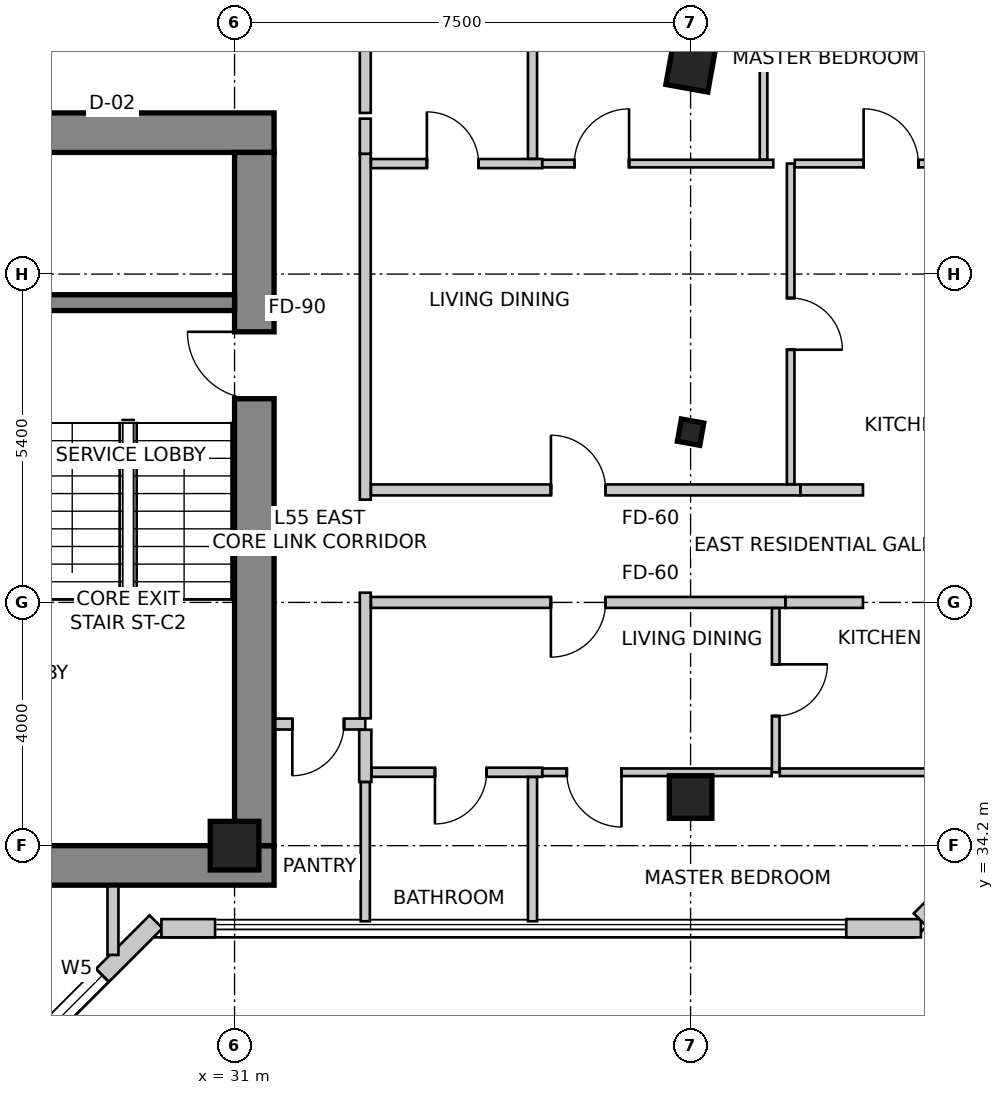
"""IFC4 building model, lengths in metres.
Left out: names, types, materials, properties, quantities, classifications, styles, units other than length and angle.
Written with IfcOpenShell. Run it as: python <this file> out.ifc"""

import sys

from ifc_helpers import new_model, si_unit, direction, frame, frame_2d, origin, origin_2d, place, context, subcontext, project, spatial, rectangle, i_section, extrude, source, transform, mapped, element, fill, save


model = new_model("IFC4")
c1 = context("Model", 3, precision=1e-05, world=origin(), true_north=direction((0.0, 1.0)))
c2 = subcontext(c1, "Body", "Model", "MODEL_VIEW")
j1 = project(units=[si_unit("LENGTHUNIT", "METRE"), si_unit("PLANEANGLEUNIT", "RADIAN")], contexts=[c1])
p1 = place(None, origin())
s1 = spatial("IfcSite", under=j1, at=p1, CompositionType="ELEMENT")
p2 = place(p1, origin())
s2 = spatial("IfcBuilding", under=s1, at=p2, CompositionType="ELEMENT")
p3 = place(p2, frame((0.0, 0.0, 218.4)))
s3 = spatial("IfcBuildingStorey", under=s2, at=p3, CompositionType="ELEMENT", Elevation=218.4)
p4 = place(p3, frame((15.95, 45.925, 0.0), z_axis=(0.0, 0.0, 1.0), x_axis=(1.0, 0.0, 0.0)))
e1 = element("IfcWall", 1, at=p4, inside=s3, PredefinedType="SHEAR", context=c2, shape_type="SweptSolid", body=[
    extrude(rectangle(XDim=15.7, YDim=0.65, at=frame_2d((7.85, 0.0))), origin(), (0.0, 0.0, 1.0), 3.5),
])
p5 = place(p3, frame((15.95, 33.875, 0.0), z_axis=(0.0, 0.0, 1.0), x_axis=(1.0, 0.0, 0.0)))
e2 = element("IfcWall", 2, at=p5, inside=s3, PredefinedType="SHEAR", context=c2, shape_type="SweptSolid", body=[
    extrude(rectangle(XDim=15.7, YDim=0.65, at=frame_2d((7.85, 0.0))), origin(), (0.0, 0.0, 1.0), 3.5),
])
m1 = source(origin(), c2, "Body", "SweptSolid", [
    extrude(rectangle(XDim=1.1, YDim=2.15, at=frame_2d((0.55, 1.075))), frame((0.0, 0.335, 0.0), z_axis=(0.0, -1.0, 0.0), x_axis=(1.0, 0.0, 0.0)), (0.0, 0.0, 1.0), 0.67),
])
p6 = place(p5, frame((10.08, 0.0, 0.0)))
e3 = element("IfcOpeningElement", 3, at=p6, cuts=e2, PredefinedType="OPENING", context=c2, shape_type="MappedRepresentation", body=[
    mapped(m1, transform((0.0, 0.0, 0.0), scale=1.0)),
])
p7 = place(p3, frame((31.325, 34.2, 0.0), z_axis=(0.0, 0.0, 1.0), x_axis=(0.0, 1.0, 0.0)))
e4 = element("IfcWall", 4, at=p7, inside=s3, PredefinedType="SHEAR", context=c2, shape_type="SweptSolid", body=[
    extrude(rectangle(XDim=11.4, YDim=0.65, at=frame_2d((5.7, 0.0))), origin(), (0.0, 0.0, 1.0), 3.5),
])
p8 = place(p7, frame((7.35, 0.0, 0.0)))
e5 = element("IfcOpeningElement", 5, at=p8, cuts=e4, PredefinedType="OPENING", context=c2, shape_type="MappedRepresentation", body=[
    mapped(m1, transform((0.0, 0.0, 0.0), scale=1.0)),
])
p9 = place(p3, frame((27.5, 43.13, 0.0), z_axis=(0.0, 0.0, 1.0), x_axis=(1.0, 0.0, 0.0)))
e6 = element("IfcWall", 6, at=p9, inside=s3, PredefinedType="SHEAR", context=c2, shape_type="SweptSolid", body=[
    extrude(rectangle(XDim=3.5, YDim=0.26, at=frame_2d((1.75, 0.0))), origin(), (0.0, 0.0, 1.0), 3.5),
])
m2 = source(origin(), c2, "Body", "SweptSolid", [
    extrude(rectangle(XDim=0.7, YDim=0.7, at=origin_2d()), origin(), (0.0, 0.0, 1.0), 3.5),
])
p10 = place(p3, frame((38.5, 47.0, 0.0), z_axis=(0.0, 0.0, 1.0), x_axis=(0.984195607969, -0.17708474032, 0.0)))
e7 = element("IfcColumn", 7, at=p10, inside=s3, PredefinedType="COLUMN", context=c2, shape_type="MappedRepresentation", body=[
    mapped(m2, transform((0.0, 0.0, 0.0), scale=1.0)),
])
m3 = source(origin(), c2, "Body", "SweptSolid", [
    extrude(rectangle(XDim=0.8, YDim=0.8, at=origin_2d()), origin(), (0.0, 0.0, 1.0), 3.5),
])
p11 = place(p3, frame((31.0, 34.2, 0.0), z_axis=(0.0, 0.0, 1.0), x_axis=(1.0, 0.0, 0.0)))
e8 = element("IfcColumn", 8, at=p11, inside=s3, PredefinedType="COLUMN", context=c2, shape_type="MappedRepresentation", body=[
    mapped(m3, transform((0.0, 0.0, 0.0), scale=1.0)),
])
p12 = place(p3, frame((38.5, 35.0, 0.0), z_axis=(0.0, 0.0, 1.0), x_axis=(1.0, 0.0, 0.0)))
e9 = element("IfcColumn", 9, at=p12, inside=s3, PredefinedType="COLUMN", context=c2, shape_type="MappedRepresentation", body=[
    mapped(m2, transform((0.0, 0.0, 0.0), scale=1.0)),
])
m4 = source(origin(), c2, "Body", "SweptSolid", [
    extrude(i_section(OverallWidth=0.374, OverallDepth=0.372, WebThickness=0.016, FlangeThickness=0.026, FilletRadius=0.015, at=origin_2d()), origin(), (0.0, 0.0, 1.0), 3.5),
])
p13 = place(p3, frame((38.5, 41.0, 0.0), z_axis=(0.0, 0.0, 1.0), x_axis=(0.984195607969, -0.17708474032, 0.0)))
e10 = element("IfcColumn", 10, at=p13, inside=s3, PredefinedType="COLUMN", context=c2, shape_type="MappedRepresentation", body=[
    mapped(m4, transform((0.0, 0.0, 0.0), scale=1.0)),
])
p14 = place(p3, frame((27.652, 30.892, 0.0), z_axis=(0.0, 0.0, 1.0), x_axis=(0.707106781187, 0.707106781187, 0.0)))
e11 = element("IfcWall", 11, at=p14, inside=s3, PredefinedType="SOLIDWALL", context=c2, shape_type="SweptSolid", body=[
    extrude(rectangle(XDim=2.907, YDim=0.3, at=frame_2d((1.454, 0.0))), origin(), (0.0, 0.0, 1.0), 3.25),
])
m5 = source(origin(), c2, "Body", "SweptSolid", [
    extrude(rectangle(XDim=1.2, YDim=1.6, at=frame_2d((0.6, 0.8))), frame((0.0, 0.16, 0.0), z_axis=(0.0, -1.0, 0.0), x_axis=(1.0, 0.0, 0.0)), (0.0, 0.0, 1.0), 0.32),
])
p15 = place(p14, frame((0.461, 0.0, 0.85)))
e12 = element("IfcOpeningElement", 12, at=p15, cuts=e11, PredefinedType="OPENING", context=c2, shape_type="MappedRepresentation", body=[
    mapped(m5, transform((0.0, 0.0, 0.0), scale=1.0)),
])
p16 = place(p3, frame((29.797, 32.842, 0.0), z_axis=(0.0, 0.0, 1.0), x_axis=(1.0, 0.0, 0.0)))
e13 = element("IfcWall", 13, at=p16, inside=s3, PredefinedType="SOLIDWALL", context=c2, shape_type="SweptSolid", body=[
    extrude(rectangle(XDim=0.882, YDim=0.3, at=frame_2d((0.441, 0.0))), origin(), (0.0, 0.0, 1.0), 3.25),
])
p17 = place(p3, frame((41.06, 32.842, 0.0), z_axis=(0.0, 0.0, 1.0), x_axis=(1.0, 0.0, 0.0)))
e14 = element("IfcWall", 14, at=p17, inside=s3, PredefinedType="SOLIDWALL", context=c2, shape_type="SweptSolid", body=[
    extrude(rectangle(XDim=1.228, YDim=0.3, at=frame_2d((0.614, 0.0))), origin(), (0.0, 0.0, 1.0), 3.25),
])
p18 = place(p3, frame((42.276, 32.98, 0.0), z_axis=(0.0, 0.0, 1.0), x_axis=(0.707106781187, 0.707106781187, 0.0)))
e15 = element("IfcWall", 15, at=p18, inside=s3, PredefinedType="SOLIDWALL", context=c2, shape_type="SweptSolid", body=[
    extrude(rectangle(XDim=4.922, YDim=0.3, at=frame_2d((2.461, 0.0))), origin(), (0.0, 0.0, 1.0), 3.25),
])
m6 = source(origin(), c2, "Body", "SweptSolid", [
    extrude(rectangle(XDim=2.4, YDim=2.2, at=frame_2d((1.2, 1.1))), frame((0.0, 0.16, 0.0), z_axis=(0.0, -1.0, 0.0), x_axis=(1.0, 0.0, 0.0)), (0.0, 0.0, 1.0), 0.32),
])
p19 = place(p18, frame((0.509, 0.0, 0.85)))
e16 = element("IfcOpeningElement", 16, at=p19, cuts=e15, PredefinedType="OPENING", context=c2, shape_type="MappedRepresentation", body=[
    mapped(m6, transform((0.0, 0.0, 0.0), scale=1.0)),
])
p20 = place(p3, frame((29.0, 33.53, 0.0), z_axis=(0.0, 0.0, 1.0), x_axis=(0.0, -1.0, 0.0)))
e17 = element("IfcWall", 17, at=p20, inside=s3, PredefinedType="PARTITIONING", context=c2, shape_type="SweptSolid", body=[
    extrude(rectangle(XDim=1.127, YDim=0.18, at=frame_2d((0.563, 0.0))), origin(), (0.0, 0.0, 1.0), 3.25),
])
p21 = place(p3, frame((33.15, 47.706, 0.0), z_axis=(0.0, 0.0, 1.0), x_axis=(0.0, -1.0, 0.0)))
e18 = element("IfcWall", 18, at=p21, inside=s3, PredefinedType="PARTITIONING", context=c2, shape_type="SweptSolid", body=[
    extrude(rectangle(XDim=1.456, YDim=0.18, at=frame_2d((0.728, 0.0))), origin(), (0.0, 0.0, 1.0), 2.919),
])
p22 = place(p3, frame((33.15, 36.2, 0.0), z_axis=(0.0, 0.0, 1.0), x_axis=(-1.0, 0.0, 0.0)))
e19 = element("IfcWall", 19, at=p22, inside=s3, PredefinedType="PARTITIONING", context=c2, shape_type="SweptSolid", body=[
    extrude(rectangle(XDim=1.48, YDim=0.18, at=frame_2d((0.74, 0.0))), origin(), (0.0, 0.0, 1.0), 3.25),
])
m7 = source(origin(), c2, "Body", "SweptSolid", [
    extrude(rectangle(XDim=0.85, YDim=2.15, at=frame_2d((0.425, 1.075))), frame((0.0, 0.1, 0.0), z_axis=(0.0, -1.0, 0.0), x_axis=(1.0, 0.0, 0.0)), (0.0, 0.0, 1.0), 0.2),
])
p23 = place(p22, frame((0.35, 0.0, 0.0)))
e20 = element("IfcOpeningElement", 20, at=p23, cuts=e19, PredefinedType="OPENING", context=c2, shape_type="MappedRepresentation", body=[
    mapped(m7, transform((0.0, 0.0, 0.0), scale=1.0)),
])
p24 = place(p3, frame((33.15, 45.577, 0.0), z_axis=(0.0, 0.0, 1.0), x_axis=(0.0, -1.0, 0.0)))
e21 = element("IfcWall", 21, at=p24, inside=s3, PredefinedType="PARTITIONING", context=c2, shape_type="SweptSolid", body=[
    extrude(rectangle(XDim=5.687, YDim=0.18, at=frame_2d((2.844, 0.0))), origin(), (0.0, 0.0, 1.0), 2.779),
])
p25 = place(p3, frame((33.15, 46.156, 0.0), z_axis=(0.0, 0.0, 1.0), x_axis=(0.0, -1.0, 0.0)))
e22 = element("IfcWall", 22, at=p25, inside=s3, PredefinedType="PARTITIONING", context=c2, shape_type="SweptSolid", body=[
    extrude(rectangle(XDim=0.577, YDim=0.18, at=frame_2d((0.289, 0.0))), origin(), (0.0, 0.0, 1.0), 2.779),
])
p26 = place(p3, frame((33.15, 38.36, 0.0), z_axis=(0.0, 0.0, 1.0), x_axis=(0.0, -1.0, 0.0)))
e23 = element("IfcWall", 23, at=p26, inside=s3, PredefinedType="PARTITIONING", context=c2, shape_type="SweptSolid", body=[
    extrude(rectangle(XDim=2.066, YDim=0.18, at=frame_2d((1.033, 0.0))), origin(), (0.0, 0.0, 1.0), 3.25),
])
p27 = place(p3, frame((33.244, 40.05, 0.0), z_axis=(0.0, 0.0, 1.0), x_axis=(1.0, 0.0, 0.0)))
e24 = element("IfcWall", 24, at=p27, inside=s3, PredefinedType="PARTITIONING", context=c2, shape_type="SweptSolid", body=[
    extrude(rectangle(XDim=7.062, YDim=0.18, at=frame_2d((3.531, 0.0))), origin(), (0.0, 0.0, 1.0), 2.766),
])
m8 = source(origin(), c2, "Body", "SweptSolid", [
    extrude(rectangle(XDim=0.9, YDim=2.15, at=frame_2d((0.45, 1.075))), frame((0.0, 0.1, 0.0), z_axis=(0.0, -1.0, 0.0), x_axis=(1.0, 0.0, 0.0)), (0.0, 0.0, 1.0), 0.2),
])
p28 = place(p27, frame((2.959, 0.0, 0.0)))
e25 = element("IfcOpeningElement", 25, at=p28, cuts=e24, PredefinedType="OPENING", context=c2, shape_type="MappedRepresentation", body=[
    mapped(m8, transform((0.0, 0.0, 0.0), scale=1.0)),
])
p29 = place(p3, frame((40.308, 40.05, 0.0), z_axis=(0.0, 0.0, 1.0), x_axis=(1.0, 0.0, 0.0)))
e26 = element("IfcWall", 26, at=p29, inside=s3, PredefinedType="PARTITIONING", context=c2, shape_type="SweptSolid", body=[
    extrude(rectangle(XDim=1.027, YDim=0.18, at=frame_2d((0.513, 0.0))), origin(), (0.0, 0.0, 1.0), 3.25),
])
p30 = place(p3, frame((40.06, 38.2, 0.0), z_axis=(0.0, 0.0, 1.0), x_axis=(-1.0, 0.0, 0.0)))
e27 = element("IfcWall", 27, at=p30, inside=s3, PredefinedType="PARTITIONING", context=c2, shape_type="SweptSolid", body=[
    extrude(rectangle(XDim=6.816, YDim=0.18, at=frame_2d((3.408, 0.0))), origin(), (0.0, 0.0, 1.0), 2.766),
])
p31 = place(p30, frame((2.958, 0.0, 0.0)))
e28 = element("IfcOpeningElement", 28, at=p31, cuts=e27, PredefinedType="OPENING", context=c2, shape_type="MappedRepresentation", body=[
    mapped(m8, transform((0.0, 0.0, 0.0), scale=1.0)),
])
p32 = place(p3, frame((41.335, 38.2, 0.0), z_axis=(0.0, 0.0, 1.0), x_axis=(-1.0, 0.0, 0.0)))
e29 = element("IfcWall", 29, at=p32, inside=s3, PredefinedType="PARTITIONING", context=c2, shape_type="SweptSolid", body=[
    extrude(rectangle(XDim=1.273, YDim=0.18, at=frame_2d((0.636, 0.0))), origin(), (0.0, 0.0, 1.0), 3.25),
])
p33 = place(p3, frame((33.15, 36.106, 0.0), z_axis=(0.0, 0.0, 1.0), x_axis=(0.0, -1.0, 0.0)))
e30 = element("IfcWall", 30, at=p33, inside=s3, PredefinedType="PARTITIONING", context=c2, shape_type="SweptSolid", body=[
    extrude(rectangle(XDim=0.859, YDim=0.2, at=frame_2d((0.429, 0.0))), origin(), (0.0, 0.0, 1.0), 3.25),
])
p34 = place(p3, frame((33.15, 35.245, 0.0), z_axis=(0.0, 0.0, 1.0), x_axis=(0.0, -1.0, 0.0)))
e31 = element("IfcWall", 31, at=p34, inside=s3, PredefinedType="PARTITIONING", context=c2, shape_type="SweptSolid", body=[
    extrude(rectangle(XDim=2.288, YDim=0.15, at=frame_2d((1.144, 0.0))), origin(), (0.0, 0.0, 1.0), 3.25),
])
p35 = place(p3, frame((40.146, 45.417, 0.0), z_axis=(0.0, 0.0, 1.0), x_axis=(0.0, -1.0, 0.0)))
e32 = element("IfcWall", 32, at=p35, inside=s3, PredefinedType="PARTITIONING", context=c2, shape_type="SweptSolid", body=[
    extrude(rectangle(XDim=5.273, YDim=0.125, at=frame_2d((2.636, 0.0))), origin(), (0.0, 0.0, 1.0), 3.25),
])
m9 = source(origin(), c2, "Body", "SweptSolid", [
    extrude(rectangle(XDim=0.85, YDim=2.15, at=frame_2d((0.425, 1.075))), frame((0.0, 0.073, 0.0), z_axis=(0.0, -1.0, 0.0), x_axis=(1.0, 0.0, 0.0)), (0.0, 0.0, 1.0), 0.145),
])
p36 = place(p35, frame((2.211, 0.0, 0.0)))
e33 = element("IfcOpeningElement", 33, at=p36, cuts=e32, PredefinedType="OPENING", context=c2, shape_type="MappedRepresentation", body=[
    mapped(m9, transform((0.0, 0.0, 0.0), scale=1.0)),
])
p37 = place(p3, frame((33.244, 45.417, 0.0), z_axis=(0.0, 0.0, 1.0), x_axis=(1.0, 0.0, 0.0)))
e34 = element("IfcWall", 34, at=p37, inside=s3, PredefinedType="PARTITIONING", context=c2, shape_type="SweptSolid", body=[
    extrude(rectangle(XDim=2.816, YDim=0.15, at=frame_2d((1.408, 0.0))), origin(), (0.0, 0.0, 1.0), 2.919),
])
m10 = source(origin(), c2, "Body", "SweptSolid", [
    extrude(rectangle(XDim=0.85, YDim=2.15, at=frame_2d((0.425, 1.075))), frame((0.0, 0.085, 0.0), z_axis=(0.0, -1.0, 0.0), x_axis=(1.0, 0.0, 0.0)), (0.0, 0.0, 1.0), 0.17),
])
p38 = place(p37, frame((0.919, 0.0, 0.0)))
e35 = element("IfcOpeningElement", 35, at=p38, cuts=e34, PredefinedType="OPENING", context=c2, shape_type="MappedRepresentation", body=[
    mapped(m10, transform((0.0, 0.0, 0.0), scale=1.0)),
])
p39 = place(p3, frame((36.062, 45.417, 0.0), z_axis=(0.0, 0.0, 1.0), x_axis=(1.0, 0.0, 0.0)))
e36 = element("IfcWall", 36, at=p39, inside=s3, PredefinedType="PARTITIONING", context=c2, shape_type="SweptSolid", body=[
    extrude(rectangle(XDim=3.798, YDim=0.125, at=frame_2d((1.899, 0.0))), origin(), (0.0, 0.0, 1.0), 2.766),
])
m11 = source(origin(), c2, "Body", "SweptSolid", [
    extrude(rectangle(XDim=0.9, YDim=2.15, at=frame_2d((0.45, 1.075))), frame((0.0, 0.073, 0.0), z_axis=(0.0, -1.0, 0.0), x_axis=(1.0, 0.0, 0.0)), (0.0, 0.0, 1.0), 0.145),
])
p40 = place(p39, frame((0.526, 0.0, 0.0)))
e37 = element("IfcOpeningElement", 37, at=p40, cuts=e36, PredefinedType="OPENING", context=c2, shape_type="MappedRepresentation", body=[
    mapped(m11, transform((0.0, 0.0, 0.0), scale=1.0)),
])
p41 = place(p3, frame((40.212, 45.417, 0.0), z_axis=(0.0, 0.0, 1.0), x_axis=(1.0, 0.0, 0.0)))
e38 = element("IfcWall", 38, at=p41, inside=s3, PredefinedType="PARTITIONING", context=c2, shape_type="SweptSolid", body=[
    extrude(rectangle(XDim=3.288, YDim=0.125, at=frame_2d((1.644, 0.0))), origin(), (0.0, 0.0, 1.0), 3.25),
])
p42 = place(p41, frame((1.133, 0.0, 0.0)))
e39 = element("IfcOpeningElement", 39, at=p42, cuts=e38, PredefinedType="OPENING", context=c2, shape_type="MappedRepresentation", body=[
    mapped(m11, transform((0.0, 0.0, 0.0), scale=1.0)),
])
p43 = place(p3, frame((35.9, 50.303, 0.0), z_axis=(0.0, 0.0, 1.0), x_axis=(0.0, -1.0, 0.0)))
e40 = element("IfcWall", 40, at=p43, inside=s3, PredefinedType="PARTITIONING", context=c2, shape_type="SweptSolid", body=[
    extrude(rectangle(XDim=4.807, YDim=0.15, at=frame_2d((2.403, 0.0))), origin(), (0.0, 0.0, 1.0), 2.542),
])
p44 = place(p3, frame((39.7, 49.639, 0.0), z_axis=(0.0, 0.0, 1.0), x_axis=(0.0, -1.0, 0.0)))
e41 = element("IfcWall", 41, at=p44, inside=s3, PredefinedType="PARTITIONING", context=c2, shape_type="SweptSolid", body=[
    extrude(rectangle(XDim=4.156, YDim=0.125, at=frame_2d((2.078, 0.0))), origin(), (0.0, 0.0, 1.0), 3.25),
])
p45 = place(p3, frame((39.9, 38.106, 0.0), z_axis=(0.0, 0.0, 1.0), x_axis=(0.0, -1.0, 0.0)))
e42 = element("IfcWall", 42, at=p45, inside=s3, PredefinedType="PARTITIONING", context=c2, shape_type="SweptSolid", body=[
    extrude(rectangle(XDim=2.699, YDim=0.125, at=frame_2d((1.35, 0.0))), origin(), (0.0, 0.0, 1.0), 3.25),
])
p46 = place(p45, frame((0.925, 0.0, 0.0)))
e43 = element("IfcOpeningElement", 43, at=p46, cuts=e42, PredefinedType="OPENING", context=c2, shape_type="MappedRepresentation", body=[
    mapped(m9, transform((0.0, 0.0, 0.0), scale=1.0)),
])
p47 = place(p3, frame((36.06, 35.407, 0.0), z_axis=(0.0, 0.0, 1.0), x_axis=(-1.0, 0.0, 0.0)))
e44 = element("IfcWall", 44, at=p47, inside=s3, PredefinedType="PARTITIONING", context=c2, shape_type="SweptSolid", body=[
    extrude(rectangle(XDim=2.806, YDim=0.15, at=frame_2d((1.403, 0.0))), origin(), (0.0, 0.0, 1.0), 3.25),
])
p48 = place(p47, frame((0.915, 0.0, 0.0)))
e45 = element("IfcOpeningElement", 45, at=p48, cuts=e44, PredefinedType="OPENING", context=c2, shape_type="MappedRepresentation", body=[
    mapped(m10, transform((0.0, 0.0, 0.0), scale=1.0)),
])
p49 = place(p3, frame((39.833, 35.407, 0.0), z_axis=(0.0, 0.0, 1.0), x_axis=(-1.0, 0.0, 0.0)))
e46 = element("IfcWall", 46, at=p49, inside=s3, PredefinedType="PARTITIONING", context=c2, shape_type="SweptSolid", body=[
    extrude(rectangle(XDim=3.771, YDim=0.125, at=frame_2d((1.886, 0.0))), origin(), (0.0, 0.0, 1.0), 2.766),
])
p50 = place(p49, frame((2.47, 0.0, 0.0)))
e47 = element("IfcOpeningElement", 47, at=p50, cuts=e46, PredefinedType="OPENING", context=c2, shape_type="MappedRepresentation", body=[
    mapped(m11, transform((0.0, 0.0, 0.0), scale=1.0)),
])
p51 = place(p3, frame((44.54, 35.407, 0.0), z_axis=(0.0, 0.0, 1.0), x_axis=(-1.0, 0.0, 0.0)))
e48 = element("IfcWall", 48, at=p51, inside=s3, PredefinedType="PARTITIONING", context=c2, shape_type="SweptSolid", body=[
    extrude(rectangle(XDim=4.574, YDim=0.125, at=frame_2d((2.287, 0.0))), origin(), (0.0, 0.0, 1.0), 3.25),
])
p52 = place(p3, frame((35.9, 35.328, 0.0), z_axis=(0.0, 0.0, 1.0), x_axis=(0.0, -1.0, 0.0)))
e49 = element("IfcWall", 49, at=p52, inside=s3, PredefinedType="PARTITIONING", context=c2, shape_type="SweptSolid", body=[
    extrude(rectangle(XDim=2.371, YDim=0.15, at=frame_2d((1.186, 0.0))), origin(), (0.0, 0.0, 1.0), 3.25),
])
m12 = source(origin(), c2, "Body", "SweptSolid", [
    extrude(rectangle(XDim=1.2, YDim=1.6, at=frame_2d((0.6, 0.8))), frame((0.0, -0.015, 0.0), z_axis=(0.0, -1.0, 0.0), x_axis=(1.0, 0.0, 0.0)), (0.0, 0.0, 1.0), 0.06),
])
p53 = place(p15, origin())
e50 = element("IfcWindow", 50, at=p53, inside=s3, PartitioningType="SINGLE_PANEL", PredefinedType="WINDOW", context=c2, shape_type="MappedRepresentation", body=[
    mapped(m12, transform((0.0, 0.0, 0.0), scale=1.0)),
])
fill(e12, e50)
m13 = source(origin(), c2, "Body", "SweptSolid", [
    extrude(rectangle(XDim=1.1, YDim=2.15, at=frame_2d((0.55, 1.075))), frame((0.0, 0.025, 0.0), z_axis=(0.0, -1.0, 0.0), x_axis=(1.0, 0.0, 0.0)), (0.0, 0.0, 1.0), 0.05),
])
p54 = place(p8, origin())
e51 = element("IfcDoor", 51, at=p54, inside=s3, OperationType="SINGLE_SWING_RIGHT", PredefinedType="DOOR", context=c2, shape_type="MappedRepresentation", body=[
    mapped(m13, transform((0.0, 0.0, 0.0), scale=1.0)),
])
fill(e5, e51)
m14 = source(origin(), c2, "Body", "SweptSolid", [
    extrude(rectangle(XDim=0.85, YDim=2.15, at=frame_2d((0.425, 1.075))), frame((0.0, 0.025, 0.0), z_axis=(0.0, -1.0, 0.0), x_axis=(1.0, 0.0, 0.0)), (0.0, 0.0, 1.0), 0.05),
])
p55 = place(p23, origin())
e52 = element("IfcDoor", 52, at=p55, inside=s3, OperationType="SINGLE_SWING_RIGHT", PredefinedType="DOOR", context=c2, shape_type="MappedRepresentation", body=[
    mapped(m14, transform((0.0, 0.0, 0.0), scale=1.0)),
])
fill(e20, e52)
m15 = source(origin(), c2, "Body", "SweptSolid", [
    extrude(rectangle(XDim=0.9, YDim=2.15, at=frame_2d((0.45, 1.075))), frame((0.0, 0.025, 0.0), z_axis=(0.0, -1.0, 0.0), x_axis=(1.0, 0.0, 0.0)), (0.0, 0.0, 1.0), 0.05),
])
p56 = place(p28, origin())
e53 = element("IfcDoor", 53, at=p56, inside=s3, OperationType="SINGLE_SWING_LEFT", PredefinedType="DOOR", context=c2, shape_type="MappedRepresentation", body=[
    mapped(m15, transform((0.0, 0.0, 0.0), scale=1.0)),
])
fill(e25, e53)
p57 = place(p36, origin())
e54 = element("IfcDoor", 54, at=p57, inside=s3, OperationType="SINGLE_SWING_RIGHT", PredefinedType="DOOR", context=c2, shape_type="MappedRepresentation", body=[
    mapped(m14, transform((0.0, 0.0, 0.0), scale=1.0)),
])
fill(e33, e54)
p58 = place(p38, origin())
e55 = element("IfcDoor", 55, at=p58, inside=s3, OperationType="SINGLE_SWING_LEFT", PredefinedType="DOOR", context=c2, shape_type="MappedRepresentation", body=[
    mapped(m14, transform((0.0, 0.0, 0.0), scale=1.0)),
])
fill(e35, e55)
m16 = source(origin(), c2, "Body", "SweptSolid", [
    extrude(rectangle(XDim=0.9, YDim=2.15, at=frame_2d((0.45, 1.075))), frame((0.0, 0.025, 0.0), z_axis=(0.0, -1.0, 0.0), x_axis=(1.0, 0.0, 0.0)), (0.0, 0.0, 1.0), 0.05),
])
p59 = place(p40, origin())
e56 = element("IfcDoor", 56, at=p59, inside=s3, OperationType="SINGLE_SWING_RIGHT", PredefinedType="DOOR", context=c2, shape_type="MappedRepresentation", body=[
    mapped(m16, transform((0.0, 0.0, 0.0), scale=1.0)),
])
fill(e37, e56)
p60 = place(p42, origin())
e57 = element("IfcDoor", 57, at=p60, inside=s3, OperationType="SINGLE_SWING_LEFT", PredefinedType="DOOR", context=c2, shape_type="MappedRepresentation", body=[
    mapped(m16, transform((0.0, 0.0, 0.0), scale=1.0)),
])
fill(e39, e57)
p61 = place(p31, origin())
e58 = element("IfcDoor", 58, at=p61, inside=s3, OperationType="SINGLE_SWING_RIGHT", PredefinedType="DOOR", context=c2, shape_type="MappedRepresentation", body=[
    mapped(m15, transform((0.0, 0.0, 0.0), scale=1.0)),
])
fill(e28, e58)
p62 = place(p46, origin())
e59 = element("IfcDoor", 59, at=p62, inside=s3, OperationType="SINGLE_SWING_LEFT", PredefinedType="DOOR", context=c2, shape_type="MappedRepresentation", body=[
    mapped(m14, transform((0.0, 0.0, 0.0), scale=1.0)),
])
fill(e43, e59)
p63 = place(p48, origin())
e60 = element("IfcDoor", 60, at=p63, inside=s3, OperationType="SINGLE_SWING_RIGHT", PredefinedType="DOOR", context=c2, shape_type="MappedRepresentation", body=[
    mapped(m14, transform((0.0, 0.0, 0.0), scale=1.0)),
])
fill(e45, e60)
p64 = place(p50, origin())
e61 = element("IfcDoor", 61, at=p64, inside=s3, OperationType="SINGLE_SWING_LEFT", PredefinedType="DOOR", context=c2, shape_type="MappedRepresentation", body=[
    mapped(m16, transform((0.0, 0.0, 0.0), scale=1.0)),
])
fill(e47, e61)
save(model, sys.argv[1])
